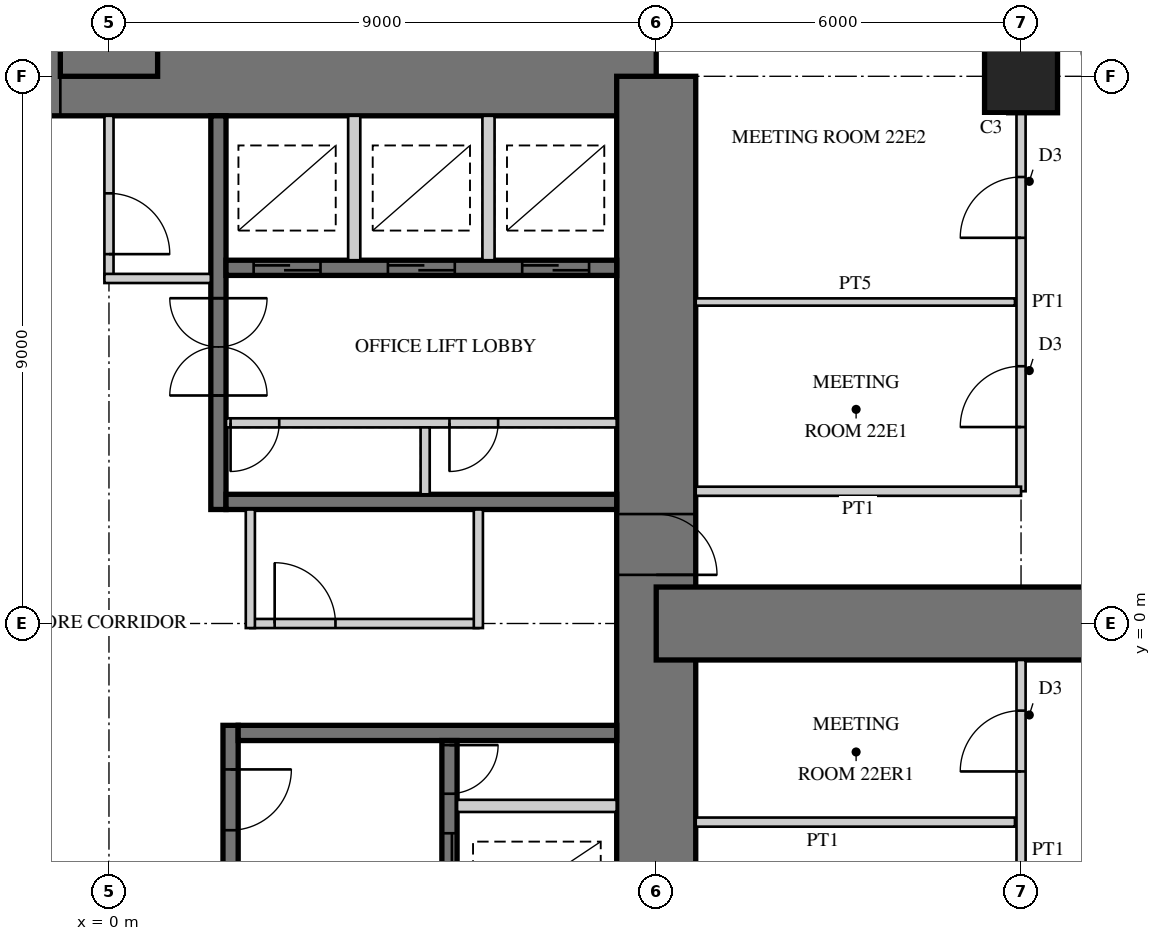
"""IFC4 building model, lengths in metres.
Left out: names, types, materials, properties, quantities, classifications, styles, units other than length and angle.
Written with IfcOpenShell. Run it as: python <this file> out.ifc"""

import sys

from ifc_helpers import new_model, si_unit, direction, frame, frame_2d, origin, origin_2d, place, context, subcontext, project, spatial, rectangle, extrude, element, fill, save


model = new_model("IFC4")
c1 = context("Model", 3, precision=1e-05, world=origin(), true_north=direction((0.0, 1.0)))
c2 = subcontext(c1, "Body", "Model", "MODEL_VIEW")
j1 = project(units=[si_unit("LENGTHUNIT", "METRE"), si_unit("PLANEANGLEUNIT", "RADIAN")], contexts=[c1])
p1 = place(None, origin())
s1 = spatial("IfcSite", under=j1, at=p1, CompositionType="ELEMENT")
p2 = place(p1, origin())
s2 = spatial("IfcBuilding", under=s1, at=p2, CompositionType="ELEMENT")
p3 = place(p2, frame((0.0, 0.0, 91.5)))
s3 = spatial("IfcBuildingStorey", under=s2, at=p3, CompositionType="ELEMENT", Elevation=91.5)
p4 = place(p3, frame((9.0, 9.0, 0.0), z_axis=(0.0, 0.0, 1.0), x_axis=(-1.0, 0.0, 0.0)))
e1 = element("IfcWall", 1, at=p4, inside=s3, PredefinedType="SHEAR", context=c2, shape_type="SweptSolid", body=[
    extrude(rectangle(XDim=18.0, YDim=1.3, at=frame_2d((9.0, 0.0))), origin(), (0.0, 0.0, 1.0), 4.0),
])
p5 = place(p4, frame((9.8, 0.0, 0.0)))
e2 = element("IfcOpeningElement", 2, at=p5, cuts=e1, PredefinedType="OPENING", context=c2, shape_type="SweptSolid", body=[
    extrude(rectangle(XDim=1.0, YDim=2.4, at=frame_2d((0.5, 1.2))), frame((0.0, 0.66, 0.0), z_axis=(0.0, -1.0, 0.0), x_axis=(1.0, 0.0, 0.0)), (0.0, 0.0, 1.0), 1.32),
])
p6 = place(p3, frame((9.0, -9.0, 0.0), z_axis=(0.0, 0.0, 1.0), x_axis=(0.0, 1.0, 0.0)))
e3 = element("IfcWall", 3, at=p6, inside=s3, PredefinedType="SHEAR", context=c2, shape_type="SweptSolid", body=[
    extrude(rectangle(XDim=18.0, YDim=1.3, at=frame_2d((9.0, 0.0))), origin(), (0.0, 0.0, 1.0), 4.0),
])
p7 = place(p6, frame((9.8, 0.0, 0.0)))
e4 = element("IfcOpeningElement", 4, at=p7, cuts=e3, PredefinedType="OPENING", context=c2, shape_type="SweptSolid", body=[
    extrude(rectangle(XDim=1.0, YDim=2.4, at=frame_2d((0.5, 1.2))), frame((0.0, 0.66, 0.0), z_axis=(0.0, -1.0, 0.0), x_axis=(1.0, 0.0, 0.0)), (0.0, 0.0, 1.0), 1.32),
])
p8 = place(p3, frame((1.8, 1.875, 0.0), z_axis=(0.0, 0.0, 1.0), x_axis=(0.0, 1.0, 0.0)))
e5 = element("IfcWall", 5, at=p8, inside=s3, PredefinedType="SHEAR", context=c2, shape_type="SweptSolid", body=[
    extrude(rectangle(XDim=6.475, YDim=0.25, at=frame_2d((3.238, 0.0))), origin(), (0.0, 0.0, 1.0), 4.0),
])
p9 = place(p8, frame((1.875, 0.0, 0.0)))
e6 = element("IfcOpeningElement", 6, at=p9, cuts=e5, PredefinedType="OPENING", context=c2, shape_type="SweptSolid", body=[
    extrude(rectangle(XDim=1.6, YDim=2.4, at=frame_2d((0.8, 1.2))), frame((0.0, 0.135, 0.0), z_axis=(0.0, -1.0, 0.0), x_axis=(1.0, 0.0, 0.0)), (0.0, 0.0, 1.0), 0.27),
])
p10 = place(p3, frame((1.925, 2.0, 0.0), z_axis=(0.0, 0.0, 1.0), x_axis=(1.0, 0.0, 0.0)))
e7 = element("IfcWall", 7, at=p10, inside=s3, PredefinedType="SHEAR", context=c2, shape_type="SweptSolid", body=[
    extrude(rectangle(XDim=6.425, YDim=0.25, at=frame_2d((3.212, 0.0))), origin(), (0.0, 0.0, 1.0), 4.0),
])
p11 = place(p3, frame((1.925, 5.85, 0.0), z_axis=(0.0, 0.0, 1.0), x_axis=(1.0, 0.0, 0.0)))
e8 = element("IfcWall", 8, at=p11, inside=s3, PredefinedType="SHEAR", context=c2, shape_type="SweptSolid", body=[
    extrude(rectangle(XDim=6.425, YDim=0.25, at=frame_2d((3.212, 0.0))), origin(), (0.0, 0.0, 1.0), 4.0),
])
p12 = place(p11, frame((0.454, 0.0, 0.0)))
e9 = element("IfcOpeningElement", 9, at=p12, cuts=e8, PredefinedType="OPENING", context=c2, shape_type="SweptSolid", body=[
    extrude(rectangle(XDim=1.1, YDim=2.2, at=frame_2d((0.55, 1.1))), frame((0.0, 0.135, 0.0), z_axis=(0.0, -1.0, 0.0), x_axis=(1.0, 0.0, 0.0)), (0.0, 0.0, 1.0), 0.27),
])
p13 = place(p11, frame((2.663, 0.0, 0.0)))
e10 = element("IfcOpeningElement", 10, at=p13, cuts=e8, PredefinedType="OPENING", context=c2, shape_type="SweptSolid", body=[
    extrude(rectangle(XDim=1.1, YDim=2.2, at=frame_2d((0.55, 1.1))), frame((0.0, 0.135, 0.0), z_axis=(0.0, -1.0, 0.0), x_axis=(1.0, 0.0, 0.0)), (0.0, 0.0, 1.0), 0.27),
])
p14 = place(p11, frame((4.871, 0.0, 0.0)))
e11 = element("IfcOpeningElement", 11, at=p14, cuts=e8, PredefinedType="OPENING", context=c2, shape_type="SweptSolid", body=[
    extrude(rectangle(XDim=1.1, YDim=2.2, at=frame_2d((0.55, 1.1))), frame((0.0, 0.135, 0.0), z_axis=(0.0, -1.0, 0.0), x_axis=(1.0, 0.0, 0.0)), (0.0, 0.0, 1.0), 0.27),
])
p15 = place(p3, frame((1.925, 3.3, 0.0), z_axis=(0.0, 0.0, 1.0), x_axis=(1.0, 0.0, 0.0)))
e12 = element("IfcWall", 12, at=p15, inside=s3, PredefinedType="PARTITIONING", context=c2, shape_type="SweptSolid", body=[
    extrude(rectangle(XDim=6.425, YDim=0.15, at=frame_2d((3.212, 0.0))), origin(), (0.0, 0.0, 1.0), 4.0),
])
p16 = place(p15, frame((0.075, 0.0, 0.0)))
e13 = element("IfcOpeningElement", 13, at=p16, cuts=e12, PredefinedType="OPENING", context=c2, shape_type="SweptSolid", body=[
    extrude(rectangle(XDim=0.8, YDim=2.1, at=frame_2d((0.4, 1.05))), frame((0.0, 0.085, 0.0), z_axis=(0.0, -1.0, 0.0), x_axis=(1.0, 0.0, 0.0)), (0.0, 0.0, 1.0), 0.17),
])
p17 = place(p15, frame((3.675, 0.0, 0.0)))
e14 = element("IfcOpeningElement", 14, at=p17, cuts=e12, PredefinedType="OPENING", context=c2, shape_type="SweptSolid", body=[
    extrude(rectangle(XDim=0.8, YDim=2.1, at=frame_2d((0.4, 1.05))), frame((0.0, 0.085, 0.0), z_axis=(0.0, -1.0, 0.0), x_axis=(1.0, 0.0, 0.0)), (0.0, 0.0, 1.0), 0.17),
])
p18 = place(p3, frame((5.2, 2.125, 0.0), z_axis=(0.0, 0.0, 1.0), x_axis=(0.0, 1.0, 0.0)))
e15 = element("IfcWall", 15, at=p18, inside=s3, PredefinedType="PARTITIONING", context=c2, shape_type="SweptSolid", body=[
    extrude(rectangle(XDim=1.1, YDim=0.15, at=frame_2d((0.55, 0.0))), origin(), (0.0, 0.0, 1.0), 4.0),
])
for number, where, z_axis, x_axis in (
    (16, (4.033, 5.975, 0.0), (0.0, 0.0, 1.0), (0.0, 1.0, 0.0)),
    (17, (6.242, 5.975, 0.0), (0.0, 0.0, 1.0), (0.0, 1.0, 0.0)),
):
    element("IfcWall", number, at=place(p3, frame(where, z_axis=z_axis, x_axis=x_axis)), inside=s3, PredefinedType="PARTITIONING", context=c2, shape_type="SweptSolid", body=[
        extrude(rectangle(XDim=2.375, YDim=0.2, at=frame_2d((1.188, 0.0))), origin(), (0.0, 0.0, 1.0), 4.0),
    ])
p19 = place(p3, frame((2.0, -1.675, 0.0), z_axis=(0.0, 0.0, 1.0), x_axis=(0.0, -1.0, 0.0)))
e18 = element("IfcWall", 18, at=p19, inside=s3, PredefinedType="SHEAR", context=c2, shape_type="SweptSolid", body=[
    extrude(rectangle(XDim=6.675, YDim=0.25, at=frame_2d((3.337, 0.0))), origin(), (0.0, 0.0, 1.0), 4.0),
])
p20 = place(p19, frame((0.725, 0.0, 0.0)))
e19 = element("IfcOpeningElement", 19, at=p20, cuts=e18, PredefinedType="OPENING", context=c2, shape_type="SweptSolid", body=[
    extrude(rectangle(XDim=1.0, YDim=2.1, at=frame_2d((0.5, 1.05))), frame((0.0, 0.135, 0.0), z_axis=(0.0, -1.0, 0.0), x_axis=(1.0, 0.0, 0.0)), (0.0, 0.0, 1.0), 0.27),
])
p21 = place(p3, frame((2.125, -1.8, 0.0), z_axis=(0.0, 0.0, 1.0), x_axis=(1.0, 0.0, 0.0)))
e20 = element("IfcWall", 20, at=p21, inside=s3, PredefinedType="SHEAR", context=c2, shape_type="SweptSolid", body=[
    extrude(rectangle(XDim=6.225, YDim=0.25, at=frame_2d((3.113, 0.0))), origin(), (0.0, 0.0, 1.0), 4.0),
])
p22 = place(p3, frame((5.6, -1.925, 0.0), z_axis=(0.0, 0.0, 1.0), x_axis=(0.0, -1.0, 0.0)))
e21 = element("IfcWall", 21, at=p22, inside=s3, PredefinedType="SHEAR", context=c2, shape_type="SweptSolid", body=[
    extrude(rectangle(XDim=3.55, YDim=0.25, at=frame_2d((1.775, 0.0))), origin(), (0.0, 0.0, 1.0), 4.0),
])
p23 = place(p22, frame((1.525, 0.0, 0.0)))
e22 = element("IfcOpeningElement", 22, at=p23, cuts=e21, PredefinedType="OPENING", context=c2, shape_type="SweptSolid", body=[
    extrude(rectangle(XDim=1.1, YDim=2.2, at=frame_2d((0.55, 1.1))), frame((0.0, 0.135, 0.0), z_axis=(0.0, -1.0, 0.0), x_axis=(1.0, 0.0, 0.0)), (0.0, 0.0, 1.0), 0.27),
])
p24 = place(p22, frame((0.075, 0.0, 0.0)))
e23 = element("IfcOpeningElement", 23, at=p24, cuts=e21, PredefinedType="OPENING", context=c2, shape_type="SweptSolid", body=[
    extrude(rectangle(XDim=0.8, YDim=2.1, at=frame_2d((0.4, 1.05))), frame((0.0, 0.135, 0.0), z_axis=(0.0, -1.0, 0.0), x_axis=(1.0, 0.0, 0.0)), (0.0, 0.0, 1.0), 0.27),
])
p25 = place(p3, frame((5.725, -3.0, 0.0), z_axis=(0.0, 0.0, 1.0), x_axis=(1.0, 0.0, 0.0)))
e24 = element("IfcWall", 24, at=p25, inside=s3, PredefinedType="PARTITIONING", context=c2, shape_type="SweptSolid", body=[
    extrude(rectangle(XDim=2.625, YDim=0.2, at=frame_2d((1.312, 0.0))), origin(), (0.0, 0.0, 1.0), 4.0),
])
p26 = place(p3, frame((0.0, 9.0, 0.0), z_axis=(0.0, 0.0, 1.0), x_axis=(0.0, 1.0, 0.0)))
e25 = element("IfcWall", 25, at=p26, inside=s3, PredefinedType="SHEAR", context=c2, shape_type="SweptSolid", body=[
    extrude(rectangle(XDim=9.0, YDim=1.6, at=frame_2d((4.5, 0.0))), origin(), (0.0, 0.0, 1.0), 4.0),
])
p27 = place(p3, frame((9.0, 0.0, 0.0), z_axis=(0.0, 0.0, 1.0), x_axis=(1.0, 0.0, 0.0)))
e26 = element("IfcWall", 26, at=p27, inside=s3, PredefinedType="SHEAR", context=c2, shape_type="SweptSolid", body=[
    extrude(rectangle(XDim=18.0, YDim=1.2, at=frame_2d((9.0, 0.0))), origin(), (0.0, 0.0, 1.0), 4.0),
])
p28 = place(p27, frame((9.9, 0.0, 0.0)))
e27 = element("IfcOpeningElement", 27, at=p28, cuts=e26, PredefinedType="OPENING", context=c2, shape_type="SweptSolid", body=[
    extrude(rectangle(XDim=1.0, YDim=2.2, at=frame_2d((0.5, 1.1))), frame((0.0, 0.61, 0.0), z_axis=(0.0, -1.0, 0.0), x_axis=(1.0, 0.0, 0.0)), (0.0, 0.0, 1.0), 1.22),
])
p29 = place(p3, frame((15.0, 9.0, 0.0), z_axis=(0.0, 0.0, 1.0), x_axis=(1.0, 0.0, 0.0)))
e28 = element("IfcColumn", 28, at=p29, inside=s3, PredefinedType="COLUMN", context=c2, shape_type="SweptSolid", body=[
    extrude(rectangle(XDim=1.2, YDim=1.2, at=origin_2d()), origin(), (0.0, 0.0, 1.0), 4.0),
])
p30 = place(p3, frame((2.325, 0.0, 0.0), z_axis=(0.0, 0.0, 1.0), x_axis=(1.0, 0.0, 0.0)))
e29 = element("IfcWall", 29, at=p30, inside=s3, PredefinedType="PARTITIONING", context=c2, shape_type="SweptSolid", body=[
    extrude(rectangle(XDim=3.75, YDim=0.15, at=frame_2d((1.875, 0.0))), origin(), (0.0, 0.0, 1.0), 3.75),
])
p31 = place(p30, frame((0.4, 0.0, 0.0)))
e30 = element("IfcOpeningElement", 30, at=p31, cuts=e29, PredefinedType="OPENING", context=c2, shape_type="SweptSolid", body=[
    extrude(rectangle(XDim=1.0, YDim=2.1, at=frame_2d((0.5, 1.05))), frame((0.0, 0.085, 0.0), z_axis=(0.0, -1.0, 0.0), x_axis=(1.0, 0.0, 0.0)), (0.0, 0.0, 1.0), 0.17),
])
for number, where, z_axis, x_axis in (
    (31, (2.325, 1.875, 0.0), (0.0, 0.0, 1.0), (0.0, -1.0, 0.0)),
    (32, (6.075, -0.075, 0.0), (0.0, 0.0, 1.0), (0.0, 1.0, 0.0)),
):
    element("IfcWall", number, at=place(p3, frame(where, z_axis=z_axis, x_axis=x_axis)), inside=s3, PredefinedType="PARTITIONING", context=c2, shape_type="SweptSolid", body=[
        extrude(rectangle(XDim=1.95, YDim=0.15, at=frame_2d((0.975, 0.0))), origin(), (0.0, 0.0, 1.0), 3.75),
    ])
p32 = place(p3, frame((0.0, 5.675, 0.0), z_axis=(0.0, 0.0, 1.0), x_axis=(0.0, 1.0, 0.0)))
e33 = element("IfcWall", 33, at=p32, inside=s3, PredefinedType="PARTITIONING", context=c2, shape_type="SweptSolid", body=[
    extrude(rectangle(XDim=2.675, YDim=0.15, at=frame_2d((1.337, 0.0))), origin(), (0.0, 0.0, 1.0), 3.75),
])
p33 = place(p32, frame((0.4, 0.0, 0.0)))
e34 = element("IfcOpeningElement", 34, at=p33, cuts=e33, PredefinedType="OPENING", context=c2, shape_type="SweptSolid", body=[
    extrude(rectangle(XDim=1.0, YDim=2.1, at=frame_2d((0.5, 1.05))), frame((0.0, 0.085, 0.0), z_axis=(0.0, -1.0, 0.0), x_axis=(1.0, 0.0, 0.0)), (0.0, 0.0, 1.0), 0.17),
])
p34 = place(p3, frame((1.675, 5.675, 0.0), z_axis=(0.0, 0.0, 1.0), x_axis=(-1.0, 0.0, 0.0)))
e35 = element("IfcWall", 35, at=p34, inside=s3, PredefinedType="PARTITIONING", context=c2, shape_type="SweptSolid", body=[
    extrude(rectangle(XDim=1.75, YDim=0.15, at=frame_2d((0.875, 0.0))), origin(), (0.0, 0.0, 1.0), 3.75),
])
p35 = place(p3, frame((15.0, 2.175, 0.0), z_axis=(0.0, 0.0, 1.0), x_axis=(0.0, 1.0, 0.0)))
e36 = element("IfcWall", 36, at=p35, inside=s3, PredefinedType="PARTITIONING", context=c2, shape_type="SweptSolid", body=[
    extrude(rectangle(XDim=6.225, YDim=0.15, at=frame_2d((3.112, 0.0))), origin(), (0.0, 0.0, 1.0), 2.7),
])
p36 = place(p35, frame((1.056, 0.0, 0.0)))
e37 = element("IfcOpeningElement", 37, at=p36, cuts=e36, PredefinedType="OPENING", context=c2, shape_type="SweptSolid", body=[
    extrude(rectangle(XDim=1.0, YDim=2.1, at=frame_2d((0.5, 1.05))), frame((0.0, 0.085, 0.0), z_axis=(0.0, -1.0, 0.0), x_axis=(1.0, 0.0, 0.0)), (0.0, 0.0, 1.0), 0.17),
])
p37 = place(p35, frame((4.169, 0.0, 0.0)))
e38 = element("IfcOpeningElement", 38, at=p37, cuts=e36, PredefinedType="OPENING", context=c2, shape_type="SweptSolid", body=[
    extrude(rectangle(XDim=1.0, YDim=2.1, at=frame_2d((0.5, 1.05))), frame((0.0, 0.085, 0.0), z_axis=(0.0, -1.0, 0.0), x_axis=(1.0, 0.0, 0.0)), (0.0, 0.0, 1.0), 0.17),
])
p38 = place(p3, frame((9.65, 2.175, 0.0), z_axis=(0.0, 0.0, 1.0), x_axis=(1.0, 0.0, 0.0)))
e39 = element("IfcWall", 39, at=p38, inside=s3, PredefinedType="PARTITIONING", context=c2, shape_type="SweptSolid", body=[
    extrude(rectangle(XDim=5.35, YDim=0.15, at=frame_2d((2.675, 0.0))), origin(), (0.0, 0.0, 1.0), 3.75),
])
p39 = place(p3, frame((9.65, 5.288, 0.0), z_axis=(0.0, 0.0, 1.0), x_axis=(1.0, 0.0, 0.0)))
e40 = element("IfcWall", 40, at=p39, inside=s3, PredefinedType="PLUMBINGWALL", context=c2, shape_type="SweptSolid", body=[
    extrude(rectangle(XDim=5.25, YDim=0.12, at=frame_2d((2.625, 0.0))), origin(), (0.0, 0.0, 1.0), 3.75),
])
p40 = place(p3, frame((15.0, -8.4, 0.0), z_axis=(0.0, 0.0, 1.0), x_axis=(0.0, 1.0, 0.0)))
e41 = element("IfcWall", 41, at=p40, inside=s3, PredefinedType="PARTITIONING", context=c2, shape_type="SweptSolid", body=[
    extrude(rectangle(XDim=7.8, YDim=0.15, at=frame_2d((3.9, 0.0))), origin(), (0.0, 0.0, 1.0), 2.7),
])
p41 = place(p40, frame((0.783, 0.0, 0.0)))
e42 = element("IfcOpeningElement", 42, at=p41, cuts=e41, PredefinedType="OPENING", context=c2, shape_type="SweptSolid", body=[
    extrude(rectangle(XDim=1.0, YDim=2.1, at=frame_2d((0.5, 1.05))), frame((0.0, 0.085, 0.0), z_axis=(0.0, -1.0, 0.0), x_axis=(1.0, 0.0, 0.0)), (0.0, 0.0, 1.0), 0.17),
])
p42 = place(p40, frame((3.35, 0.0, 0.0)))
e43 = element("IfcOpeningElement", 43, at=p42, cuts=e41, PredefinedType="OPENING", context=c2, shape_type="SweptSolid", body=[
    extrude(rectangle(XDim=1.0, YDim=2.1, at=frame_2d((0.5, 1.05))), frame((0.0, 0.085, 0.0), z_axis=(0.0, -1.0, 0.0), x_axis=(1.0, 0.0, 0.0)), (0.0, 0.0, 1.0), 0.17),
])
p43 = place(p40, frame((5.967, 0.0, 0.0)))
e44 = element("IfcOpeningElement", 44, at=p43, cuts=e41, PredefinedType="OPENING", context=c2, shape_type="SweptSolid", body=[
    extrude(rectangle(XDim=1.0, YDim=2.1, at=frame_2d((0.5, 1.05))), frame((0.0, 0.085, 0.0), z_axis=(0.0, -1.0, 0.0), x_axis=(1.0, 0.0, 0.0)), (0.0, 0.0, 1.0), 0.17),
])
p44 = place(p3, frame((9.65, -3.267, 0.0), z_axis=(0.0, 0.0, 1.0), x_axis=(1.0, 0.0, 0.0)))
e45 = element("IfcWall", 45, at=p44, inside=s3, PredefinedType="PARTITIONING", context=c2, shape_type="SweptSolid", body=[
    extrude(rectangle(XDim=5.25, YDim=0.15, at=frame_2d((2.625, 0.0))), origin(), (0.0, 0.0, 1.0), 3.75),
])
p45 = place(p31, origin())
e46 = element("IfcDoor", 46, at=p45, inside=s3, OperationType="SINGLE_SWING_LEFT", PredefinedType="DOOR", context=c2, shape_type="SweptSolid", body=[
    extrude(rectangle(XDim=1.0, YDim=2.1, at=frame_2d((0.5, 1.05))), frame((0.0, 0.025, 0.0), z_axis=(0.0, -1.0, 0.0), x_axis=(1.0, 0.0, 0.0)), (0.0, 0.0, 1.0), 0.05),
])
fill(e30, e46)
p46 = place(p33, frame((1.0, 0.0, 0.0), z_axis=(0.0, 0.0, 1.0), x_axis=(-1.0, 0.0, 0.0)))
e47 = element("IfcDoor", 47, at=p46, inside=s3, OperationType="SINGLE_SWING_RIGHT", PredefinedType="DOOR", context=c2, shape_type="SweptSolid", body=[
    extrude(rectangle(XDim=1.0, YDim=2.1, at=frame_2d((0.5, 1.05))), frame((0.0, 0.025, 0.0), z_axis=(0.0, -1.0, 0.0), x_axis=(1.0, 0.0, 0.0)), (0.0, 0.0, 1.0), 0.05),
])
fill(e34, e47)
p47 = place(p36, origin())
e48 = element("IfcDoor", 48, at=p47, inside=s3, OperationType="SINGLE_SWING_LEFT", PredefinedType="DOOR", context=c2, shape_type="SweptSolid", body=[
    extrude(rectangle(XDim=1.0, YDim=2.1, at=frame_2d((0.5, 1.05))), frame((0.0, 0.025, 0.0), z_axis=(0.0, -1.0, 0.0), x_axis=(1.0, 0.0, 0.0)), (0.0, 0.0, 1.0), 0.05),
])
fill(e37, e48)
p48 = place(p37, origin())
e49 = element("IfcDoor", 49, at=p48, inside=s3, OperationType="SINGLE_SWING_LEFT", PredefinedType="DOOR", context=c2, shape_type="SweptSolid", body=[
    extrude(rectangle(XDim=1.0, YDim=2.1, at=frame_2d((0.5, 1.05))), frame((0.0, 0.025, 0.0), z_axis=(0.0, -1.0, 0.0), x_axis=(1.0, 0.0, 0.0)), (0.0, 0.0, 1.0), 0.05),
])
fill(e38, e49)
p49 = place(p43, origin())
e50 = element("IfcDoor", 50, at=p49, inside=s3, OperationType="SINGLE_SWING_LEFT", PredefinedType="DOOR", context=c2, shape_type="SweptSolid", body=[
    extrude(rectangle(XDim=1.0, YDim=2.1, at=frame_2d((0.5, 1.05))), frame((0.0, 0.025, 0.0), z_axis=(0.0, -1.0, 0.0), x_axis=(1.0, 0.0, 0.0)), (0.0, 0.0, 1.0), 0.05),
])
fill(e44, e50)
p50 = place(p5, frame((1.0, 0.0, 0.0), z_axis=(0.0, 0.0, 1.0), x_axis=(-1.0, 0.0, 0.0)))
e51 = element("IfcDoor", 51, at=p50, inside=s3, OperationType="SINGLE_SWING_RIGHT", PredefinedType="DOOR", context=c2, shape_type="SweptSolid", body=[
    extrude(rectangle(XDim=1.0, YDim=2.4, at=frame_2d((0.5, 1.2))), frame((0.0, -0.005, 0.0), z_axis=(0.0, -1.0, 0.0), x_axis=(1.0, 0.0, 0.0)), (0.0, 0.0, 1.0), 0.05),
])
fill(e2, e51)
p51 = place(p7, frame((1.0, 0.0, 0.0), z_axis=(0.0, 0.0, 1.0), x_axis=(-1.0, 0.0, 0.0)))
e52 = element("IfcDoor", 52, at=p51, inside=s3, OperationType="SINGLE_SWING_RIGHT", PredefinedType="DOOR", context=c2, shape_type="SweptSolid", body=[
    extrude(rectangle(XDim=1.0, YDim=2.4, at=frame_2d((0.5, 1.2))), frame((0.0, -0.005, 0.0), z_axis=(0.0, -1.0, 0.0), x_axis=(1.0, 0.0, 0.0)), (0.0, 0.0, 1.0), 0.05),
])
fill(e4, e52)
p52 = place(p12, origin())
e53 = element("IfcDoor", 53, at=p52, inside=s3, OperationType="DOUBLE_DOOR_SLIDING", PredefinedType="DOOR", context=c2, shape_type="SweptSolid", body=[
    extrude(rectangle(XDim=1.1, YDim=2.2, at=frame_2d((0.55, 1.1))), frame((0.0, 0.025, 0.0), z_axis=(0.0, -1.0, 0.0), x_axis=(1.0, 0.0, 0.0)), (0.0, 0.0, 1.0), 0.05),
])
fill(e9, e53)
p53 = place(p13, origin())
e54 = element("IfcDoor", 54, at=p53, inside=s3, OperationType="DOUBLE_DOOR_SLIDING", PredefinedType="DOOR", context=c2, shape_type="SweptSolid", body=[
    extrude(rectangle(XDim=1.1, YDim=2.2, at=frame_2d((0.55, 1.1))), frame((0.0, 0.025, 0.0), z_axis=(0.0, -1.0, 0.0), x_axis=(1.0, 0.0, 0.0)), (0.0, 0.0, 1.0), 0.05),
])
fill(e10, e54)
p54 = place(p14, origin())
e55 = element("IfcDoor", 55, at=p54, inside=s3, OperationType="DOUBLE_DOOR_SLIDING", PredefinedType="DOOR", context=c2, shape_type="SweptSolid", body=[
    extrude(rectangle(XDim=1.1, YDim=2.2, at=frame_2d((0.55, 1.1))), frame((0.0, 0.025, 0.0), z_axis=(0.0, -1.0, 0.0), x_axis=(1.0, 0.0, 0.0)), (0.0, 0.0, 1.0), 0.05),
])
fill(e11, e55)
p55 = place(p9, origin())
e56 = element("IfcDoor", 56, at=p55, inside=s3, OperationType="DOUBLE_DOOR_DOUBLE_SWING", PredefinedType="DOOR", context=c2, shape_type="SweptSolid", body=[
    extrude(rectangle(XDim=1.6, YDim=2.4, at=frame_2d((0.8, 1.2))), frame((0.0, 0.025, 0.0), z_axis=(0.0, -1.0, 0.0), x_axis=(1.0, 0.0, 0.0)), (0.0, 0.0, 1.0), 0.05),
])
fill(e6, e56)
p56 = place(p16, frame((0.8, 0.0, 0.0), z_axis=(0.0, 0.0, 1.0), x_axis=(-1.0, 0.0, 0.0)))
e57 = element("IfcDoor", 57, at=p56, inside=s3, OperationType="SINGLE_SWING_RIGHT", PredefinedType="DOOR", context=c2, shape_type="SweptSolid", body=[
    extrude(rectangle(XDim=0.8, YDim=2.1, at=frame_2d((0.4, 1.05))), frame((0.0, 0.025, 0.0), z_axis=(0.0, -1.0, 0.0), x_axis=(1.0, 0.0, 0.0)), (0.0, 0.0, 1.0), 0.05),
])
fill(e13, e57)
p57 = place(p17, frame((0.8, 0.0, 0.0), z_axis=(0.0, 0.0, 1.0), x_axis=(-1.0, 0.0, 0.0)))
e58 = element("IfcDoor", 58, at=p57, inside=s3, OperationType="SINGLE_SWING_RIGHT", PredefinedType="DOOR", context=c2, shape_type="SweptSolid", body=[
    extrude(rectangle(XDim=0.8, YDim=2.1, at=frame_2d((0.4, 1.05))), frame((0.0, 0.025, 0.0), z_axis=(0.0, -1.0, 0.0), x_axis=(1.0, 0.0, 0.0)), (0.0, 0.0, 1.0), 0.05),
])
fill(e14, e58)
p58 = place(p20, origin())
e59 = element("IfcDoor", 59, at=p58, inside=s3, OperationType="SINGLE_SWING_LEFT", PredefinedType="DOOR", context=c2, shape_type="SweptSolid", body=[
    extrude(rectangle(XDim=1.0, YDim=2.1, at=frame_2d((0.5, 1.05))), frame((0.0, 0.025, 0.0), z_axis=(0.0, -1.0, 0.0), x_axis=(1.0, 0.0, 0.0)), (0.0, 0.0, 1.0), 0.05),
])
fill(e19, e59)
p59 = place(p23, origin())
e60 = element("IfcDoor", 60, at=p59, inside=s3, OperationType="DOUBLE_DOOR_SLIDING", PredefinedType="DOOR", context=c2, shape_type="SweptSolid", body=[
    extrude(rectangle(XDim=1.1, YDim=2.2, at=frame_2d((0.55, 1.1))), frame((0.0, 0.025, 0.0), z_axis=(0.0, -1.0, 0.0), x_axis=(1.0, 0.0, 0.0)), (0.0, 0.0, 1.0), 0.05),
])
fill(e22, e60)
p60 = place(p24, origin())
e61 = element("IfcDoor", 61, at=p60, inside=s3, OperationType="SINGLE_SWING_LEFT", PredefinedType="DOOR", context=c2, shape_type="SweptSolid", body=[
    extrude(rectangle(XDim=0.8, YDim=2.1, at=frame_2d((0.4, 1.05))), frame((0.0, 0.025, 0.0), z_axis=(0.0, -1.0, 0.0), x_axis=(1.0, 0.0, 0.0)), (0.0, 0.0, 1.0), 0.05),
])
fill(e23, e61)
save(model, sys.argv[1])
